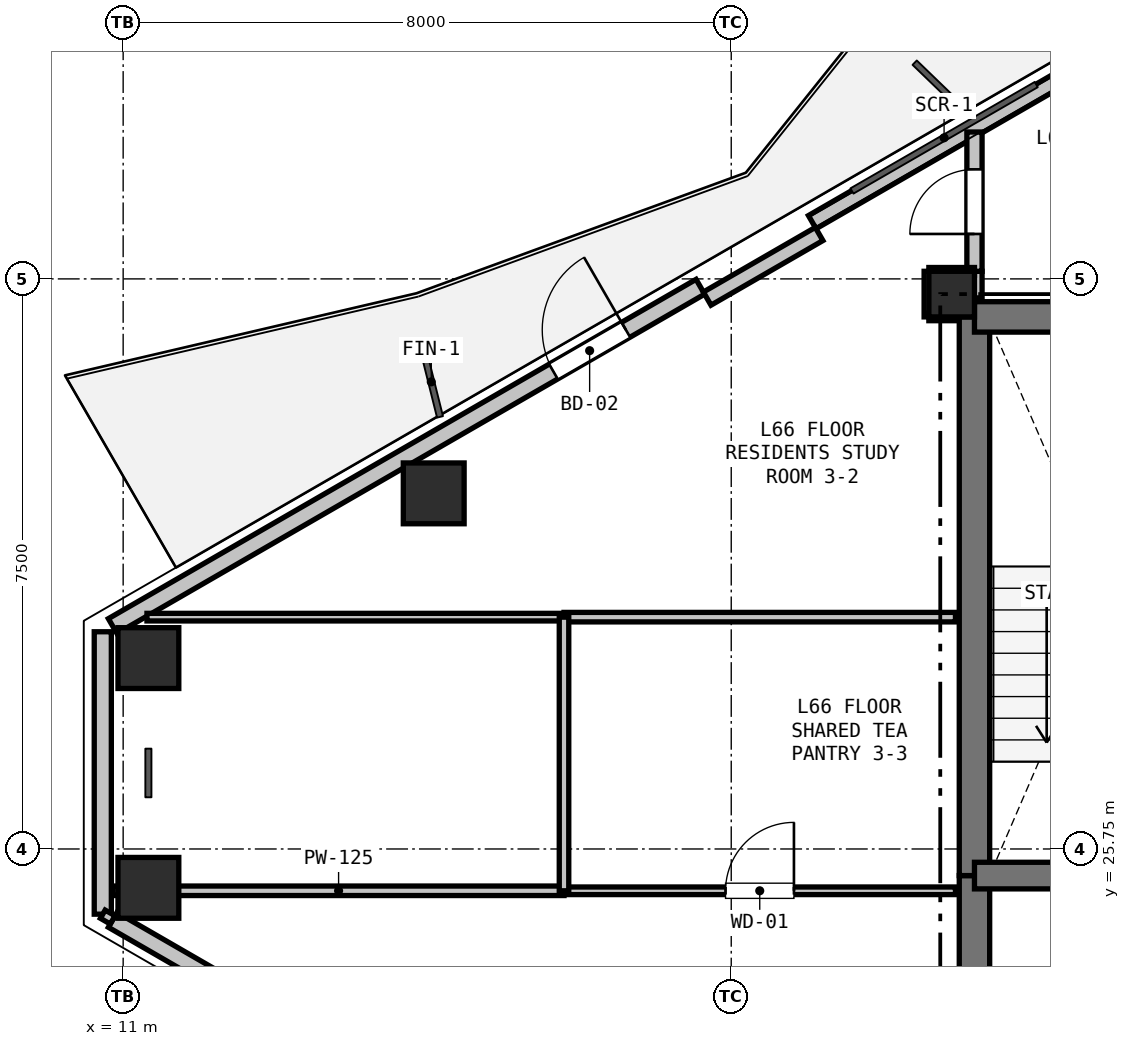
"""IFC4 building model, lengths in metres.
Left out: names, types, materials, properties, quantities, classifications, styles, units other than length and angle.
Written with IfcOpenShell. Run it as: python <this file> out.ifc"""

import sys

from ifc_helpers import new_model, si_unit, direction, frame, frame_2d, origin, origin_2d, place, context, subcontext, project, spatial, rectangle, hollow_rectangle, extrude, element, fill, save


model = new_model("IFC4")
c1 = context("Model", 3, precision=1e-05, world=origin(), true_north=direction((0.0, 1.0)))
c2 = subcontext(c1, "Body", "Model", "MODEL_VIEW")
j1 = project(units=[si_unit("LENGTHUNIT", "METRE"), si_unit("PLANEANGLEUNIT", "RADIAN")], contexts=[c1])
p1 = place(None, origin())
s1 = spatial("IfcSite", under=j1, at=p1, CompositionType="ELEMENT")
p2 = place(p1, origin())
s2 = spatial("IfcBuilding", under=s1, at=p2, CompositionType="ELEMENT")
p3 = place(p2, frame((0.0, 0.0, 236.4)))
s3 = spatial("IfcBuildingStorey", under=s2, at=p3, CompositionType="ELEMENT", Elevation=236.4)
p4 = place(p3, frame((21.9, 33.05, 0.0), z_axis=(0.0, 0.0, 1.0), x_axis=(1.0, 0.0, 0.0)))
e1 = element("IfcColumn", 1, at=p4, inside=s3, PredefinedType="COLUMN", context=c2, shape_type="SweptSolid", body=[
    extrude(rectangle(XDim=0.6, YDim=0.6, at=origin_2d()), origin(), (0.0, 0.0, 1.0), 3.3),
])
for number, where, z_axis, x_axis in (
    (2, (11.332, 28.261, 0.0), (0.0, 0.0, 1.0), (1.0, 0.0, 0.0)),
    (3, (15.086, 30.428, 0.0), (0.0, 0.0, 1.0), (1.0, 0.0, 0.0)),
    (4, (11.332, 25.239, 0.0), (0.0, 0.0, 1.0), (1.0, 0.0, 0.0)),
):
    element("IfcColumn", number, at=place(p3, frame(where, z_axis=z_axis, x_axis=x_axis)), inside=s3, PredefinedType="COLUMN", context=c2, shape_type="SweptSolid", body=[
        extrude(hollow_rectangle(XDim=0.8, YDim=0.8, WallThickness=0.025, at=origin_2d()), origin(), (0.0, 0.0, 1.0), 3.3),
    ])
p5 = place(p3, frame((10.732, 24.892, 0.0), z_axis=(0.0, 0.0, 1.0), x_axis=(0.0, 1.0, 0.0)))
e5 = element("IfcWall", 5, at=p5, inside=s3, PredefinedType="SOLIDWALL", context=c2, shape_type="SweptSolid", body=[
    extrude(rectangle(XDim=3.715, YDim=0.225, at=frame_2d((1.858, 0.0))), origin(), (0.0, 0.0, 1.0), 2.7),
])
p6 = place(p3, frame((10.862, 28.683, 0.0), z_axis=(0.0, 0.0, 1.0), x_axis=(0.866026655105, 0.499997832642, 0.0)))
e6 = element("IfcWall", 6, at=p6, inside=s3, PredefinedType="SOLIDWALL", context=c2, shape_type="SweptSolid", body=[
    extrude(rectangle(XDim=8.928, YDim=0.225, at=frame_2d((4.464, 0.0))), origin(), (0.0, 0.0, 1.0), 2.7),
])
p7 = place(p6, frame((6.696, 0.0, 0.0)))
e7 = element("IfcOpeningElement", 7, at=p7, cuts=e6, PredefinedType="OPENING", context=c2, shape_type="SweptSolid", body=[
    extrude(rectangle(XDim=1.1, YDim=2.1, at=frame_2d((0.55, 1.05))), frame((0.0, 0.123, 0.0), z_axis=(0.0, -1.0, 0.0), x_axis=(1.0, 0.0, 0.0)), (0.0, 0.0, 1.0), 0.245),
])
p8 = place(p3, frame((20.066, 33.997, 0.0), z_axis=(0.0, 0.0, 1.0), x_axis=(0.866019557082, 0.500010126649, 0.0)))
e8 = element("IfcWall", 8, at=p8, inside=s3, PredefinedType="PARAPET", context=c2, shape_type="SweptSolid", body=[
    extrude(rectangle(XDim=8.228, YDim=0.2, at=frame_2d((4.114, 0.0))), origin(), (0.0, 0.0, 1.0), 0.2),
])
p9 = place(p3, frame((18.684, 32.991, 0.0), z_axis=(0.0, 0.0, 1.0), x_axis=(0.866025371046, 0.500000056704, 0.0)))
e9 = element("IfcWall", 9, at=p9, inside=s3, PredefinedType="PARAPET", context=c2, shape_type="SweptSolid", body=[
    extrude(rectangle(XDim=1.7, YDim=0.2, at=frame_2d((0.85, 0.0))), origin(), (0.0, 0.0, 1.0), 2.7),
])
p10 = place(p3, frame((18.594, 20.354, 0.0), z_axis=(0.0, 0.0, 1.0), x_axis=(-0.866026655105, 0.499997832642, 0.0)))
e10 = element("IfcWall", 10, at=p10, inside=s3, PredefinedType="SOLIDWALL", context=c2, shape_type="SweptSolid", body=[
    extrude(rectangle(XDim=8.928, YDim=0.225, at=frame_2d((4.464, 0.0))), origin(), (0.0, 0.0, 1.0), 2.7),
])
p11 = place(p3, frame((22.2, 20.75, 0.0), z_axis=(0.0, 0.0, 1.0), x_axis=(0.0, 1.0, 0.0)))
e11 = element("IfcWall", 11, at=p11, inside=s3, PredefinedType="SHEAR", context=c2, shape_type="SweptSolid", body=[
    extrude(rectangle(XDim=4.65, YDim=0.4, at=frame_2d((2.325, 0.0))), origin(), (0.0, 0.0, 1.0), 3.08),
])
p12 = place(p3, frame((22.2, 25.4, 0.0), z_axis=(0.0, 0.0, 1.0), x_axis=(0.0, 1.0, 0.0)))
e12 = element("IfcWall", 12, at=p12, inside=s3, PredefinedType="SHEAR", context=c2, shape_type="SweptSolid", body=[
    extrude(rectangle(XDim=7.35, YDim=0.4, at=frame_2d((3.675, 0.0))), origin(), (0.0, 0.0, 1.0), 3.08),
])
p13 = place(p3, frame((22.2, 32.75, 0.0), z_axis=(0.0, 0.0, 1.0), x_axis=(1.0, 0.0, 0.0)))
e13 = element("IfcWall", 13, at=p13, inside=s3, PredefinedType="SHEAR", context=c2, shape_type="SweptSolid", body=[
    extrude(rectangle(XDim=3.45, YDim=0.4, at=frame_2d((1.725, 0.0))), origin(), (0.0, 0.0, 1.0), 3.08),
])
p14 = place(p3, frame((22.2, 25.4, 0.0), z_axis=(0.0, 0.0, 1.0), x_axis=(1.0, 0.0, 0.0)))
e14 = element("IfcWall", 14, at=p14, inside=s3, PredefinedType="SHEAR", context=c2, shape_type="SweptSolid", body=[
    extrude(rectangle(XDim=3.45, YDim=0.35, at=frame_2d((1.725, 0.0))), origin(), (0.0, 0.0, 1.0), 3.08),
])
p15 = place(p14, frame((1.15, 0.0, 0.0)))
e15 = element("IfcOpeningElement", 15, at=p15, cuts=e14, PredefinedType="OPENING", context=c2, shape_type="SweptSolid", body=[
    extrude(rectangle(XDim=1.15, YDim=2.15, at=frame_2d((0.575, 1.075))), frame((0.0, 0.185, 0.0), z_axis=(0.0, -1.0, 0.0), x_axis=(1.0, 0.0, 0.0)), (0.0, 0.0, 1.0), 0.37),
])
p16 = place(p3, frame((10.868, 25.2, 0.0), z_axis=(0.0, 0.0, 1.0), x_axis=(1.0, 0.0, 0.0)))
e16 = element("IfcWall", 16, at=p16, inside=s3, PredefinedType="PARTITIONING", context=c2, shape_type="SweptSolid", body=[
    extrude(rectangle(XDim=5.932, YDim=0.125, at=frame_2d((2.966, 0.0))), origin(), (0.0, 0.0, 1.0), 2.528),
])
p17 = place(p3, frame((16.8, 25.2, 0.0), z_axis=(0.0, 0.0, 1.0), x_axis=(1.0, 0.0, 0.0)))
e17 = element("IfcWall", 17, at=p17, inside=s3, PredefinedType="PARTITIONING", context=c2, shape_type="SweptSolid", body=[
    extrude(rectangle(XDim=5.15, YDim=0.1, at=frame_2d((2.575, 0.0))), origin(), (0.0, 0.0, 1.0), 2.605),
])
p18 = place(p17, frame((2.125, 0.0, 0.0)))
e18 = element("IfcOpeningElement", 18, at=p18, cuts=e17, PredefinedType="OPENING", context=c2, shape_type="SweptSolid", body=[
    extrude(rectangle(XDim=0.9, YDim=2.1, at=frame_2d((0.45, 1.05))), frame((0.0, 0.06, 0.0), z_axis=(0.0, -1.0, 0.0), x_axis=(1.0, 0.0, 0.0)), (0.0, 0.0, 1.0), 0.12),
])
p19 = place(p3, frame((10.862, 24.817, 0.0), z_axis=(0.0, 0.0, 1.0), x_axis=(-0.866131372301, 0.499816412211, 0.0)))
e19 = element("IfcWall", 19, at=p19, inside=s3, PredefinedType="PARTITIONING", context=c2, shape_type="SweptSolid", body=[
    extrude(rectangle(XDim=0.15, YDim=0.125, at=frame_2d((0.075, 0.0))), origin(), (0.0, 0.0, 1.0), 3.08),
])
p20 = place(p3, frame((22.2, 33.0, 0.0), z_axis=(0.0, 0.0, 1.0), x_axis=(0.0, 1.0, 0.0)))
e20 = element("IfcWall", 20, at=p20, inside=s3, PredefinedType="PARTITIONING", context=c2, shape_type="SweptSolid", body=[
    extrude(rectangle(XDim=0.35, YDim=0.2, at=frame_2d((0.175, 0.0))), origin(), (0.0, 0.0, 1.0), 2.605),
])
p21 = place(p3, frame((22.2, 33.35, 0.0), z_axis=(0.0, 0.0, 1.0), x_axis=(0.0, 1.0, 0.0)))
e21 = element("IfcWall", 21, at=p21, inside=s3, PredefinedType="PARTITIONING", context=c2, shape_type="SweptSolid", body=[
    extrude(rectangle(XDim=1.833, YDim=0.2, at=frame_2d((0.916, 0.0))), origin(), (0.0, 0.0, 1.0), 2.365),
])
p22 = place(p21, frame((0.491, 0.0, 0.0)))
e22 = element("IfcOpeningElement", 22, at=p22, cuts=e21, PredefinedType="OPENING", context=c2, shape_type="SweptSolid", body=[
    extrude(rectangle(XDim=0.85, YDim=2.1, at=frame_2d((0.425, 1.05))), frame((0.0, 0.11, 0.0), z_axis=(0.0, -1.0, 0.0), x_axis=(1.0, 0.0, 0.0)), (0.0, 0.0, 1.0), 0.22),
])
p23 = place(p3, frame((22.2, 33.35, 0.0), z_axis=(0.0, 0.0, 1.0), x_axis=(-1.0, 0.0, 0.0)))
e23 = element("IfcWall", 23, at=p23, inside=s3, PredefinedType="PARTITIONING", context=c2, shape_type="SweptSolid", body=[
    extrude(rectangle(XDim=0.6, YDim=0.1, at=frame_2d((0.3, 0.0))), origin(), (0.0, 0.0, 1.0), 3.08),
])
p24 = place(p3, frame((21.6, 33.35, 0.0), z_axis=(0.0, 0.0, 1.0), x_axis=(0.0, -1.0, 0.0)))
e24 = element("IfcWall", 24, at=p24, inside=s3, PredefinedType="PARTITIONING", context=c2, shape_type="SweptSolid", body=[
    extrude(rectangle(XDim=0.6, YDim=0.125, at=frame_2d((0.3, 0.0))), origin(), (0.0, 0.0, 1.0), 2.528),
])
p25 = place(p3, frame((21.6, 32.75, 0.0), z_axis=(0.0, 0.0, 1.0), x_axis=(1.0, 0.0, 0.0)))
e25 = element("IfcWall", 25, at=p25, inside=s3, PredefinedType="PARTITIONING", context=c2, shape_type="SweptSolid", body=[
    extrude(rectangle(XDim=0.35, YDim=0.1, at=frame_2d((0.175, 0.0))), origin(), (0.0, 0.0, 1.0), 2.605),
])
p26 = place(p3, frame((21.95, 28.8, 0.0), z_axis=(0.0, 0.0, 1.0), x_axis=(-1.0, 0.0, 0.0)))
e26 = element("IfcWall", 26, at=p26, inside=s3, PredefinedType="PARTITIONING", context=c2, shape_type="SweptSolid", body=[
    extrude(rectangle(XDim=5.15, YDim=0.125, at=frame_2d((2.575, 0.0))), origin(), (0.0, 0.0, 1.0), 2.605),
])
p27 = place(p3, frame((16.8, 28.8, 0.0), z_axis=(0.0, 0.0, 1.0), x_axis=(-1.0, 0.0, 0.0)))
e27 = element("IfcWall", 27, at=p27, inside=s3, PredefinedType="PARTITIONING", context=c2, shape_type="SweptSolid", body=[
    extrude(rectangle(XDim=5.487, YDim=0.1, at=frame_2d((2.743, 0.0))), origin(), (0.0, 0.0, 1.0), 2.805),
])
p28 = place(p3, frame((16.8, 25.2, 0.0), z_axis=(0.0, 0.0, 1.0), x_axis=(0.0, 1.0, 0.0)))
e28 = element("IfcWall", 28, at=p28, inside=s3, PredefinedType="PARTITIONING", context=c2, shape_type="SweptSolid", body=[
    extrude(rectangle(XDim=3.6, YDim=0.125, at=frame_2d((1.8, 0.0))), origin(), (0.0, 0.0, 1.0), 3.08),
])
p29 = place(p7, origin())
e29 = element("IfcDoor", 29, at=p29, inside=s3, OperationType="SINGLE_SWING_RIGHT", PredefinedType="DOOR", context=c2, shape_type="SweptSolid", body=[
    extrude(rectangle(XDim=1.1, YDim=2.1, at=frame_2d((0.55, 1.05))), frame((0.0, 0.025, 0.0), z_axis=(0.0, -1.0, 0.0), x_axis=(1.0, 0.0, 0.0)), (0.0, 0.0, 1.0), 0.05),
])
fill(e7, e29)
p30 = place(p22, origin())
e30 = element("IfcDoor", 30, at=p30, inside=s3, OperationType="SINGLE_SWING_LEFT", PredefinedType="DOOR", context=c2, shape_type="SweptSolid", body=[
    extrude(rectangle(XDim=0.85, YDim=2.1, at=frame_2d((0.425, 1.05))), frame((0.0, 0.025, 0.0), z_axis=(0.0, -1.0, 0.0), x_axis=(1.0, 0.0, 0.0)), (0.0, 0.0, 1.0), 0.05),
])
fill(e22, e30)
p31 = place(p18, origin())
e31 = element("IfcDoor", 31, at=p31, inside=s3, OperationType="SINGLE_SWING_RIGHT", PredefinedType="DOOR", context=c2, shape_type="SweptSolid", body=[
    extrude(rectangle(XDim=0.9, YDim=2.1, at=frame_2d((0.45, 1.05))), frame((0.0, 0.025, 0.0), z_axis=(0.0, -1.0, 0.0), x_axis=(1.0, 0.0, 0.0)), (0.0, 0.0, 1.0), 0.05),
])
fill(e18, e31)
save(model, sys.argv[1])
